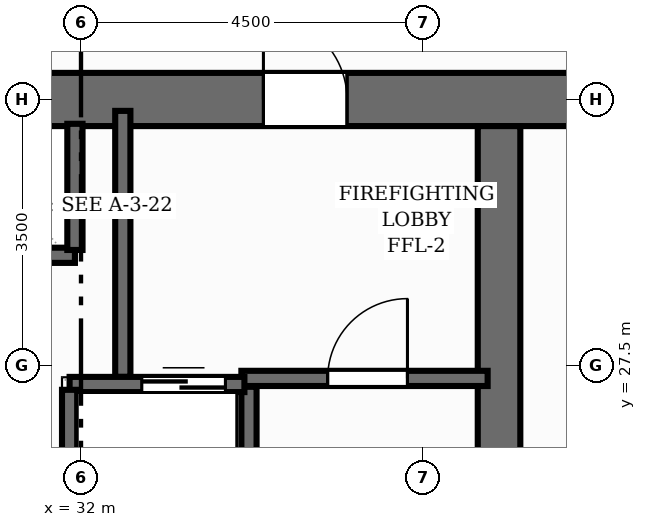
"""IFC4 building model, lengths in metres.
Left out: names, types, materials, properties, quantities, classifications, styles, units other than length and angle.
Written with IfcOpenShell. Run it as: python <this file> out.ifc"""

import sys

from ifc_helpers import new_model, si_unit, direction, frame, frame_2d, origin, place, context, subcontext, project, spatial, rectangle, extrude, element, fill, save


model = new_model("IFC4")
c1 = context("Model", 3, precision=1e-05, world=origin(), true_north=direction((0.0, 1.0)))
c2 = subcontext(c1, "Body", "Model", "MODEL_VIEW")
j1 = project(units=[si_unit("LENGTHUNIT", "METRE"), si_unit("PLANEANGLEUNIT", "RADIAN")], contexts=[c1])
p1 = place(None, origin())
s1 = spatial("IfcSite", under=j1, at=p1, CompositionType="ELEMENT")
p2 = place(p1, origin())
s2 = spatial("IfcBuilding", under=s1, at=p2, CompositionType="ELEMENT")
p3 = place(p2, frame((0.0, 0.0, 86.88)))
s3 = spatial("IfcBuildingStorey", under=s2, at=p3, CompositionType="ELEMENT", Elevation=86.88)
p4 = place(p3, frame((22.65, 31.0, 0.0), z_axis=(0.0, 0.0, 1.0), x_axis=(1.0, 0.0, 0.0)))
e1 = element("IfcWall", 1, at=p4, inside=s3, PredefinedType="SHEAR", context=c2, shape_type="SweptSolid", body=[
    extrude(rectangle(XDim=18.7, YDim=0.7, at=frame_2d((9.35, 0.0))), origin(), (0.0, 0.0, 1.0), 3.2),
])
p5 = place(p4, frame((11.75, 0.0, 0.0)))
e2 = element("IfcOpeningElement", 2, at=p5, cuts=e1, PredefinedType="OPENING", context=c2, shape_type="SweptSolid", body=[
    extrude(rectangle(XDim=1.1, YDim=2.15, at=frame_2d((0.55, 1.075))), frame((0.0, 0.36, 0.0), z_axis=(0.0, -1.0, 0.0), x_axis=(1.0, 0.0, 0.0)), (0.0, 0.0, 1.0), 0.72),
])
p6 = place(p3, frame((37.5, 17.35, 0.0), z_axis=(0.0, 0.0, 1.0), x_axis=(0.0, 1.0, 0.0)))
e3 = element("IfcWall", 3, at=p6, inside=s3, PredefinedType="SHEAR", context=c2, shape_type="SweptSolid", body=[
    extrude(rectangle(XDim=13.3, YDim=0.56, at=frame_2d((6.65, 0.0))), origin(), (0.0, 0.0, 1.0), 3.2),
])
p7 = place(p3, frame((34.21, 20.78, 0.0), z_axis=(0.0, 0.0, 1.0), x_axis=(0.0, 1.0, 0.0)))
e4 = element("IfcWall", 4, at=p7, inside=s3, PredefinedType="SHEAR", context=c2, shape_type="SweptSolid", body=[
    extrude(rectangle(XDim=6.44, YDim=0.2, at=frame_2d((3.22, 0.0))), origin(), (0.0, 0.0, 1.0), 3.2),
])
p8 = place(p3, frame((34.11, 27.33, 0.0), z_axis=(0.0, 0.0, 1.0), x_axis=(1.0, 0.0, 0.0)))
e5 = element("IfcWall", 5, at=p8, inside=s3, PredefinedType="SHEAR", context=c2, shape_type="SweptSolid", body=[
    extrude(rectangle(XDim=3.24, YDim=0.2, at=frame_2d((1.62, 0.0))), origin(), (0.0, 0.0, 1.0), 3.2),
])
p9 = place(p8, frame((1.135, 0.0, 0.0)))
e6 = element("IfcOpeningElement", 6, at=p9, cuts=e5, PredefinedType="OPENING", context=c2, shape_type="SweptSolid", body=[
    extrude(rectangle(XDim=1.05, YDim=2.15, at=frame_2d((0.525, 1.075))), frame((0.0, 0.11, 0.0), z_axis=(0.0, -1.0, 0.0), x_axis=(1.0, 0.0, 0.0)), (0.0, 0.0, 1.0), 0.22),
])
p10 = place(p3, frame((32.55, 27.35, 0.0), z_axis=(0.0, 0.0, 1.0), x_axis=(0.0, 1.0, 0.0)))
e7 = element("IfcWall", 7, at=p10, inside=s3, PredefinedType="SHEAR", context=c2, shape_type="SweptSolid", body=[
    extrude(rectangle(XDim=3.5, YDim=0.2, at=frame_2d((1.75, 0.0))), origin(), (0.0, 0.0, 1.0), 3.2),
])
p11 = place(p3, frame((31.85, 27.25, 0.0), z_axis=(0.0, 0.0, 1.0), x_axis=(1.0, 0.0, 0.0)))
e8 = element("IfcWall", 8, at=p11, inside=s3, PredefinedType="SHEAR", context=c2, shape_type="SweptSolid", body=[
    extrude(rectangle(XDim=2.3, YDim=0.2, at=frame_2d((1.15, 0.0))), origin(), (0.0, 0.0, 1.0), 3.2),
])
p12 = place(p11, frame((0.95, 0.0, 0.0)))
e9 = element("IfcOpeningElement", 9, at=p12, cuts=e8, PredefinedType="OPENING", context=c2, shape_type="SweptSolid", body=[
    extrude(rectangle(XDim=1.1, YDim=2.15, at=frame_2d((0.55, 1.075))), frame((0.0, 0.11, 0.0), z_axis=(0.0, -1.0, 0.0), x_axis=(1.0, 0.0, 0.0)), (0.0, 0.0, 1.0), 0.22),
])
p13 = place(p3, frame((31.85, 25.47, 0.0), z_axis=(0.0, 0.0, 1.0), x_axis=(0.0, 1.0, 0.0)))
e10 = element("IfcWall", 10, at=p13, inside=s3, PredefinedType="SHEAR", context=c2, shape_type="SweptSolid", body=[
    extrude(rectangle(XDim=1.71, YDim=0.2, at=frame_2d((0.855, 0.0))), origin(), (0.0, 0.0, 1.0), 3.2),
])
p14 = place(p3, frame((26.68, 28.95, 0.0), z_axis=(0.0, 0.0, 1.0), x_axis=(1.0, 0.0, 0.0)))
e11 = element("IfcWall", 11, at=p14, inside=s3, PredefinedType="SHEAR", context=c2, shape_type="SweptSolid", body=[
    extrude(rectangle(XDim=5.24, YDim=0.2, at=frame_2d((2.62, 0.0))), origin(), (0.0, 0.0, 1.0), 3.2),
])
p15 = place(p3, frame((31.92, 29.02, 0.0), z_axis=(0.0, 0.0, 1.0), x_axis=(0.0, 1.0, 0.0)))
e12 = element("IfcWall", 12, at=p15, inside=s3, PredefinedType="SHEAR", context=c2, shape_type="SweptSolid", body=[
    extrude(rectangle(XDim=1.66, YDim=0.2, at=frame_2d((0.83, 0.0))), origin(), (0.0, 0.0, 1.0), 3.2),
])
p16 = place(p9, origin())
e13 = element("IfcDoor", 13, at=p16, inside=s3, OperationType="SINGLE_SWING_RIGHT", PredefinedType="DOOR", context=c2, shape_type="SweptSolid", body=[
    extrude(rectangle(XDim=1.05, YDim=2.15, at=frame_2d((0.525, 1.075))), frame((0.0, 0.025, 0.0), z_axis=(0.0, -1.0, 0.0), x_axis=(1.0, 0.0, 0.0)), (0.0, 0.0, 1.0), 0.05),
])
fill(e6, e13)
p17 = place(p5, origin())
e14 = element("IfcDoor", 14, at=p17, inside=s3, OperationType="SINGLE_SWING_LEFT", PredefinedType="DOOR", context=c2, shape_type="SweptSolid", body=[
    extrude(rectangle(XDim=1.1, YDim=2.15, at=frame_2d((0.55, 1.075))), frame((0.0, 0.025, 0.0), z_axis=(0.0, -1.0, 0.0), x_axis=(1.0, 0.0, 0.0)), (0.0, 0.0, 1.0), 0.05),
])
fill(e2, e14)
p18 = place(p12, origin())
e15 = element("IfcDoor", 15, at=p18, inside=s3, OperationType="DOUBLE_DOOR_SLIDING", PredefinedType="DOOR", context=c2, shape_type="SweptSolid", body=[
    extrude(rectangle(XDim=1.1, YDim=2.15, at=frame_2d((0.55, 1.075))), frame((0.0, 0.025, 0.0), z_axis=(0.0, -1.0, 0.0), x_axis=(1.0, 0.0, 0.0)), (0.0, 0.0, 1.0), 0.05),
])
fill(e9, e15)
save(model, sys.argv[1])
